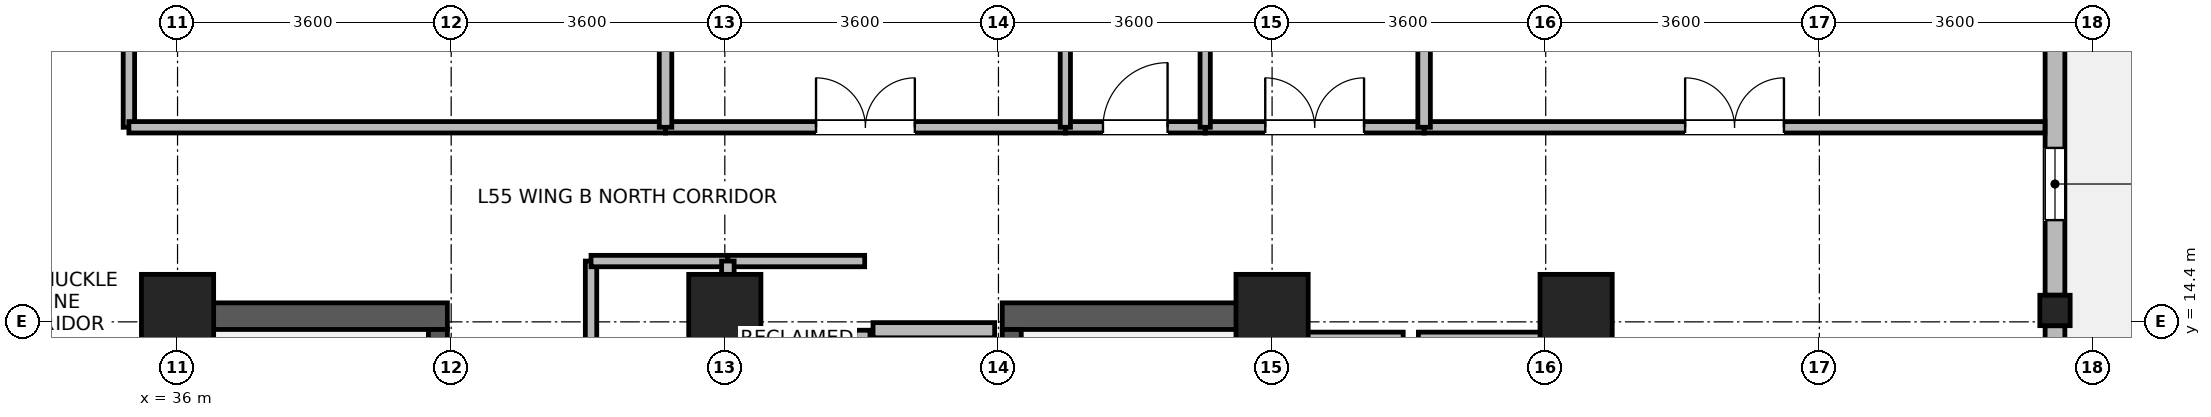
"""IFC4 building model, lengths in metres.
Left out: names, types, materials, properties, quantities, classifications, styles, units other than length and angle.
Written with IfcOpenShell. Run it as: python <this file> out.ifc"""

import sys

from ifc_helpers import new_model, si_unit, direction, frame, frame_2d, origin, origin_2d, place, context, subcontext, project, spatial, rectangle, i_section, extrude, source, transform, mapped, element, fill, save


model = new_model("IFC4")
c1 = context("Model", 3, precision=1e-05, world=origin(), true_north=direction((0.0, 1.0)))
c2 = subcontext(c1, "Body", "Model", "MODEL_VIEW")
j1 = project(units=[si_unit("LENGTHUNIT", "METRE"), si_unit("PLANEANGLEUNIT", "RADIAN")], contexts=[c1])
p1 = place(None, origin())
s1 = spatial("IfcSite", under=j1, at=p1, CompositionType="ELEMENT")
p2 = place(p1, origin())
s2 = spatial("IfcBuilding", under=s1, at=p2, CompositionType="ELEMENT")
p3 = place(p2, frame((0.0, 0.0, 216.6)))
s3 = spatial("IfcBuildingStorey", under=s2, at=p3, CompositionType="ELEMENT", Elevation=216.6)
for number, where, z_axis, x_axis in (
    (1, (36.175, 6.95, 0.0), (0.0, 0.0, 1.0), (0.0, 1.0, 0.0)),
    (2, (50.225, 6.95, 0.0), (0.0, 0.0, 1.0), (0.0, 1.0, 0.0)),
):
    element("IfcWall", number, at=place(p3, frame(where, z_axis=z_axis, x_axis=x_axis)), inside=s3, PredefinedType="SHEAR", context=c2, shape_type="SweptSolid", body=[
        extrude(rectangle(XDim=7.7, YDim=0.35, at=frame_2d((3.85, 0.0))), origin(), (0.0, 0.0, 1.0), 3.47),
    ])
for number, where, z_axis, x_axis in (
    (3, (36.35, 14.475, 0.0), (0.0, 0.0, 1.0), (1.0, 0.0, 0.0)),
    (4, (46.85, 14.475, 0.0), (0.0, 0.0, 1.0), (1.0, 0.0, 0.0)),
):
    element("IfcWall", number, at=place(p3, frame(where, z_axis=z_axis, x_axis=x_axis)), inside=s3, PredefinedType="SHEAR", context=c2, shape_type="SweptSolid", body=[
        extrude(rectangle(XDim=3.2, YDim=0.35, at=frame_2d((1.6, 0.0))), origin(), (0.0, 0.0, 1.0), 3.47),
    ])
p4 = place(p3, frame((39.425, 7.3, 0.0), z_axis=(0.0, 0.0, 1.0), x_axis=(0.0, 1.0, 0.0)))
e5 = element("IfcWall", 5, at=p4, inside=s3, PredefinedType="SHEAR", context=c2, shape_type="SweptSolid", body=[
    extrude(rectangle(XDim=7.0, YDim=0.25, at=frame_2d((3.5, 0.0))), origin(), (0.0, 0.0, 1.0), 3.47),
])
p5 = place(p4, frame((0.15, 0.0, 0.0)))
e6 = element("IfcOpeningElement", 6, at=p5, cuts=e5, PredefinedType="OPENING", context=c2, shape_type="SweptSolid", body=[
    extrude(rectangle(XDim=1.1, YDim=2.08, at=frame_2d((0.55, 1.04))), frame((0.0, 0.135, 0.0), z_axis=(0.0, -1.0, 0.0), x_axis=(1.0, 0.0, 0.0)), (0.0, 0.0, 1.0), 0.27),
])
p6 = place(p3, frame((46.975, 7.3, 0.0), z_axis=(0.0, 0.0, 1.0), x_axis=(0.0, 1.0, 0.0)))
e7 = element("IfcWall", 7, at=p6, inside=s3, PredefinedType="SHEAR", context=c2, shape_type="SweptSolid", body=[
    extrude(rectangle(XDim=7.0, YDim=0.25, at=frame_2d((3.5, 0.0))), origin(), (0.0, 0.0, 1.0), 3.47),
])
p7 = place(p6, frame((0.15, 0.0, 0.0)))
e8 = element("IfcOpeningElement", 8, at=p7, cuts=e7, PredefinedType="OPENING", context=c2, shape_type="SweptSolid", body=[
    extrude(rectangle(XDim=1.1, YDim=2.08, at=frame_2d((0.55, 1.04))), frame((0.0, 0.135, 0.0), z_axis=(0.0, -1.0, 0.0), x_axis=(1.0, 0.0, 0.0)), (0.0, 0.0, 1.0), 0.27),
])
m1 = source(origin(), c2, "Body", "SweptSolid", [
    extrude(rectangle(XDim=0.95, YDim=0.95, at=origin_2d()), origin(), (0.0, 0.0, 1.0), 3.7),
])
for number, where, z_axis, x_axis in (
    (9, (36.0, 14.55, 0.0), (0.0, 0.0, 1.0), (1.0, 0.0, 0.0)),
    (10, (43.2, 14.55, 0.0), (0.0, 0.0, 1.0), (1.0, 0.0, 0.0)),
    (11, (50.4, 14.55, 0.0), (0.0, 0.0, 1.0), (1.0, 0.0, 0.0)),
    (12, (54.4, 14.55, 0.0), (0.0, 0.0, 1.0), (1.0, 0.0, 0.0)),
):
    element("IfcColumn", number, at=place(p3, frame(where, z_axis=z_axis, x_axis=x_axis)), inside=s3, PredefinedType="COLUMN", context=c2, shape_type="MappedRepresentation", body=[
        mapped(m1, transform((0.0, 0.0, 0.0), x_axis=(1.0, 0.0, 0.0), y_axis=(0.0, 1.0, 0.0), z_axis=(0.0, 0.0, 1.0), scale=1.0)),
    ])
m2 = source(origin(), c2, "Body", "SweptSolid", [
    extrude(i_section(OverallWidth=0.399, OverallDepth=0.4, WebThickness=0.017, FlangeThickness=0.023, FilletRadius=0.015, at=origin_2d()), origin(), (0.0, 0.0, 1.0), 3.7),
])
p8 = place(p3, frame((60.7, 14.55, 0.0), z_axis=(0.0, 0.0, 1.0), x_axis=(1.0, 0.0, 0.0)))
e13 = element("IfcColumn", 13, at=p8, inside=s3, PredefinedType="COLUMN", context=c2, shape_type="MappedRepresentation", body=[
    mapped(m2, transform((0.0, 0.0, 0.0), x_axis=(1.0, 0.0, 0.0), y_axis=(0.0, 1.0, 0.0), z_axis=(0.0, 0.0, 1.0), scale=1.0)),
])
p9 = place(p3, frame((60.7, 14.349, 0.0), z_axis=(0.0, 0.0, 1.0), x_axis=(0.0, -1.0, 0.0)))
e14 = element("IfcWall", 14, at=p9, inside=s3, PredefinedType="STANDARD", context=c2, shape_type="SweptSolid", body=[
    extrude(rectangle(XDim=7.098, YDim=0.26, at=frame_2d((3.549, 0.0))), origin(), (0.0, 0.0, 1.0), 3.05),
])
p10 = place(p9, frame((2.799, 0.0, 0.0)))
e15 = element("IfcOpeningElement", 15, at=p10, cuts=e14, PredefinedType="OPENING", context=c2, shape_type="SweptSolid", body=[
    extrude(rectangle(XDim=1.5, YDim=2.15, at=frame_2d((0.75, 1.075))), frame((0.0, 0.14, 0.0), z_axis=(0.0, -1.0, 0.0), x_axis=(1.0, 0.0, 0.0)), (0.0, 0.0, 1.0), 0.28),
])
p11 = place(p3, frame((60.7, 21.399, 0.0), z_axis=(0.0, 0.0, 1.0), x_axis=(0.0, -1.0, 0.0)))
e16 = element("IfcWall", 16, at=p11, inside=s3, PredefinedType="STANDARD", context=c2, shape_type="SweptSolid", body=[
    extrude(rectangle(XDim=6.648, YDim=0.26, at=frame_2d((3.324, 0.0))), origin(), (0.0, 0.0, 1.0), 3.05),
])
p12 = place(p11, frame((0.762, 0.0, 0.85)))
e17 = element("IfcOpeningElement", 17, at=p12, cuts=e16, PredefinedType="OPENING", context=c2, shape_type="SweptSolid", body=[
    extrude(rectangle(XDim=1.8, YDim=1.85, at=frame_2d((0.9, 0.925))), frame((0.0, 0.14, 0.0), z_axis=(0.0, -1.0, 0.0), x_axis=(1.0, 0.0, 0.0)), (0.0, 0.0, 1.0), 0.28),
])
p13 = place(p11, frame((4.71, 0.0, 0.85)))
e18 = element("IfcOpeningElement", 18, at=p13, cuts=e16, PredefinedType="OPENING", context=c2, shape_type="SweptSolid", body=[
    extrude(rectangle(XDim=0.95, YDim=1.75, at=frame_2d((0.475, 0.875))), frame((0.0, 0.14, 0.0), z_axis=(0.0, -1.0, 0.0), x_axis=(1.0, 0.0, 0.0)), (0.0, 0.0, 1.0), 0.28),
])
p14 = place(p3, frame((50.475, 14.165, 0.0), z_axis=(0.0, 0.0, 1.0), x_axis=(1.0, 0.0, 0.0)))
e19 = element("IfcWall", 19, at=p14, inside=s3, PredefinedType="PARTITIONING", context=c2, shape_type="SweptSolid", body=[
    extrude(rectangle(XDim=1.65, YDim=0.2, at=frame_2d((0.825, 0.0))), origin(), (0.0, 0.0, 1.0), 3.45),
])
p15 = place(p3, frame((52.325, 14.165, 0.0), z_axis=(0.0, 0.0, 1.0), x_axis=(1.0, 0.0, 0.0)))
e20 = element("IfcWall", 20, at=p15, inside=s3, PredefinedType="PARTITIONING", context=c2, shape_type="SweptSolid", body=[
    extrude(rectangle(XDim=1.65, YDim=0.2, at=frame_2d((0.825, 0.0))), origin(), (0.0, 0.0, 1.0), 3.45),
])
p16 = place(p3, frame((45.15, 14.29, 0.0), z_axis=(0.0, 0.0, 1.0), x_axis=(1.0, 0.0, 0.0)))
e21 = element("IfcWall", 21, at=p16, inside=s3, PredefinedType="PARTITIONING", context=c2, shape_type="SweptSolid", body=[
    extrude(rectangle(XDim=1.6, YDim=0.2, at=frame_2d((0.8, 0.0))), origin(), (0.0, 0.0, 1.0), 2.55),
])
p17 = place(p3, frame((45.01, 11.61, 0.0), z_axis=(0.0, 0.0, 1.0), x_axis=(0.0, 1.0, 0.0)))
e22 = element("IfcWall", 22, at=p17, inside=s3, PredefinedType="PARTITIONING", context=c2, shape_type="SweptSolid", body=[
    extrude(rectangle(XDim=2.68, YDim=0.2, at=frame_2d((1.34, 0.0))), origin(), (0.0, 0.0, 1.0), 3.45),
])
p18 = place(p3, frame((35.36, 16.96, 0.0), z_axis=(0.0, 0.0, 1.0), x_axis=(0.0, 1.0, 0.0)))
e23 = element("IfcWall", 23, at=p18, inside=s3, PredefinedType="PARTITIONING", context=c2, shape_type="SweptSolid", body=[
    extrude(rectangle(XDim=9.8, YDim=0.15, at=frame_2d((4.9, 0.0))), origin(), (0.0, 0.0, 1.0), 3.45),
])
p19 = place(p18, frame((2.486, 0.0, 0.0)))
e24 = element("IfcOpeningElement", 24, at=p19, cuts=e23, PredefinedType="OPENING", context=c2, shape_type="SweptSolid", body=[
    extrude(rectangle(XDim=1.3, YDim=2.12, at=frame_2d((0.65, 1.06))), frame((0.0, 0.085, 0.0), z_axis=(0.0, -1.0, 0.0), x_axis=(1.0, 0.0, 0.0)), (0.0, 0.0, 1.0), 0.17),
])
p20 = place(p3, frame((52.4, 16.96, 0.0), z_axis=(0.0, 0.0, 1.0), x_axis=(1.0, 0.0, 0.0)))
e25 = element("IfcWall", 25, at=p20, inside=s3, PredefinedType="PARTITIONING", context=c2, shape_type="SweptSolid", body=[
    extrude(rectangle(XDim=8.168, YDim=0.15, at=frame_2d((4.084, 0.0))), origin(), (0.0, 0.0, 1.0), 3.45),
])
p21 = place(p20, frame((3.434, 0.0, 0.0)))
e26 = element("IfcOpeningElement", 26, at=p21, cuts=e25, PredefinedType="OPENING", context=c2, shape_type="SweptSolid", body=[
    extrude(rectangle(XDim=1.3, YDim=2.12, at=frame_2d((0.65, 1.06))), frame((0.0, 0.085, 0.0), z_axis=(0.0, -1.0, 0.0), x_axis=(1.0, 0.0, 0.0)), (0.0, 0.0, 1.0), 0.17),
])
p22 = place(p3, frame((35.36, 16.96, 0.0), z_axis=(0.0, 0.0, 1.0), x_axis=(1.0, 0.0, 0.0)))
e27 = element("IfcWall", 27, at=p22, inside=s3, PredefinedType="PARTITIONING", context=c2, shape_type="SweptSolid", body=[
    extrude(rectangle(XDim=7.06, YDim=0.15, at=frame_2d((3.53, 0.0))), origin(), (0.0, 0.0, 1.0), 3.45),
])
p23 = place(p3, frame((42.42, 16.96, 0.0), z_axis=(0.0, 0.0, 1.0), x_axis=(1.0, 0.0, 0.0)))
e28 = element("IfcWall", 28, at=p23, inside=s3, PredefinedType="PARTITIONING", context=c2, shape_type="SweptSolid", body=[
    extrude(rectangle(XDim=5.26, YDim=0.15, at=frame_2d((2.63, 0.0))), origin(), (0.0, 0.0, 1.0), 3.45),
])
p24 = place(p23, frame((1.98, 0.0, 0.0)))
e29 = element("IfcOpeningElement", 29, at=p24, cuts=e28, PredefinedType="OPENING", context=c2, shape_type="SweptSolid", body=[
    extrude(rectangle(XDim=1.3, YDim=2.12, at=frame_2d((0.65, 1.06))), frame((0.0, 0.085, 0.0), z_axis=(0.0, -1.0, 0.0), x_axis=(1.0, 0.0, 0.0)), (0.0, 0.0, 1.0), 0.17),
])
p25 = place(p3, frame((41.44, 11.64, 0.0), z_axis=(0.0, 0.0, 1.0), x_axis=(0.0, 1.0, 0.0)))
e30 = element("IfcWall", 30, at=p25, inside=s3, PredefinedType="PARTITIONING", context=c2, shape_type="SweptSolid", body=[
    extrude(rectangle(XDim=3.56, YDim=0.15, at=frame_2d((1.78, 0.0))), origin(), (0.0, 0.0, 1.0), 3.45),
])
p26 = place(p25, frame((1.13, 0.0, 0.0)))
e31 = element("IfcOpeningElement", 31, at=p26, cuts=e30, PredefinedType="OPENING", context=c2, shape_type="SweptSolid", body=[
    extrude(rectangle(XDim=1.3, YDim=2.12, at=frame_2d((0.65, 1.06))), frame((0.0, 0.085, 0.0), z_axis=(0.0, -1.0, 0.0), x_axis=(1.0, 0.0, 0.0)), (0.0, 0.0, 1.0), 0.17),
])
p27 = place(p3, frame((49.52, 16.96, 0.0), z_axis=(0.0, 0.0, 1.0), x_axis=(1.0, 0.0, 0.0)))
e32 = element("IfcWall", 32, at=p27, inside=s3, PredefinedType="PARTITIONING", context=c2, shape_type="SweptSolid", body=[
    extrude(rectangle(XDim=2.88, YDim=0.15, at=frame_2d((1.44, 0.0))), origin(), (0.0, 0.0, 1.0), 3.45),
])
p28 = place(p27, frame((0.79, 0.0, 0.0)))
e33 = element("IfcOpeningElement", 33, at=p28, cuts=e32, PredefinedType="OPENING", context=c2, shape_type="SweptSolid", body=[
    extrude(rectangle(XDim=1.3, YDim=2.12, at=frame_2d((0.65, 1.06))), frame((0.0, 0.085, 0.0), z_axis=(0.0, -1.0, 0.0), x_axis=(1.0, 0.0, 0.0)), (0.0, 0.0, 1.0), 0.17),
])
p29 = place(p3, frame((47.68, 16.96, 0.0), z_axis=(0.0, 0.0, 1.0), x_axis=(1.0, 0.0, 0.0)))
e34 = element("IfcWall", 34, at=p29, inside=s3, PredefinedType="PARTITIONING", context=c2, shape_type="SweptSolid", body=[
    extrude(rectangle(XDim=1.84, YDim=0.15, at=frame_2d((0.92, 0.0))), origin(), (0.0, 0.0, 1.0), 3.45),
])
p30 = place(p29, frame((0.495, 0.0, 0.0)))
e35 = element("IfcOpeningElement", 35, at=p30, cuts=e34, PredefinedType="OPENING", context=c2, shape_type="SweptSolid", body=[
    extrude(rectangle(XDim=0.85, YDim=2.04, at=frame_2d((0.425, 1.02))), frame((0.0, 0.085, 0.0), z_axis=(0.0, -1.0, 0.0), x_axis=(1.0, 0.0, 0.0)), (0.0, 0.0, 1.0), 0.17),
])
for number, where, z_axis, x_axis in (
    (36, (41.44, 15.2, 0.0), (0.0, 0.0, 1.0), (1.0, 0.0, 0.0)),
    (37, (43.24, 15.2, 0.0), (0.0, 0.0, 1.0), (1.0, 0.0, 0.0)),
):
    element("IfcWall", number, at=place(p3, frame(where, z_axis=z_axis, x_axis=x_axis)), inside=s3, PredefinedType="PARTITIONING", context=c2, shape_type="SweptSolid", body=[
        extrude(rectangle(XDim=1.8, YDim=0.15, at=frame_2d((0.9, 0.0))), origin(), (0.0, 0.0, 1.0), 3.45),
    ])
p31 = place(p3, frame((42.42, 16.96, 0.0), z_axis=(0.0, 0.0, 1.0), x_axis=(0.0, 1.0, 0.0)))
e38 = element("IfcWall", 38, at=p31, inside=s3, PredefinedType="PARTITIONING", context=c2, shape_type="SweptSolid", body=[
    extrude(rectangle(XDim=9.8, YDim=0.165, at=frame_2d((4.9, 0.0))), origin(), (0.0, 0.0, 1.0), 3.45),
])
for number, where, z_axis, x_axis in (
    (39, (47.68, 16.96, 0.0), (0.0, 0.0, 1.0), (0.0, 1.0, 0.0)),
    (40, (49.52, 16.96, 0.0), (0.0, 0.0, 1.0), (0.0, 1.0, 0.0)),
):
    element("IfcWall", number, at=place(p3, frame(where, z_axis=z_axis, x_axis=x_axis)), inside=s3, PredefinedType="PARTITIONING", context=c2, shape_type="SweptSolid", body=[
        extrude(rectangle(XDim=9.8, YDim=0.135, at=frame_2d((4.9, 0.0))), origin(), (0.0, 0.0, 1.0), 3.45),
    ])
p32 = place(p3, frame((52.4, 16.96, 0.0), z_axis=(0.0, 0.0, 1.0), x_axis=(0.0, 1.0, 0.0)))
e41 = element("IfcWall", 41, at=p32, inside=s3, PredefinedType="PARTITIONING", context=c2, shape_type="SweptSolid", body=[
    extrude(rectangle(XDim=9.8, YDim=0.165, at=frame_2d((4.9, 0.0))), origin(), (0.0, 0.0, 1.0), 3.45),
])
p33 = place(p3, frame((43.24, 11.64, 0.0), z_axis=(0.0, 0.0, 1.0), x_axis=(0.0, 1.0, 0.0)))
e42 = element("IfcWall", 42, at=p33, inside=s3, PredefinedType="PARTITIONING", context=c2, shape_type="SweptSolid", body=[
    extrude(rectangle(XDim=3.56, YDim=0.165, at=frame_2d((1.78, 0.0))), origin(), (0.0, 0.0, 1.0), 3.45),
])
p34 = place(p13, origin())
e43 = element("IfcWindow", 43, at=p34, inside=s3, PartitioningType="SINGLE_PANEL", PredefinedType="WINDOW", context=c2, shape_type="SweptSolid", body=[
    extrude(rectangle(XDim=0.95, YDim=1.75, at=frame_2d((0.475, 0.875))), frame((0.0, 0.03, 0.0), z_axis=(0.0, -1.0, 0.0), x_axis=(1.0, 0.0, 0.0)), (0.0, 0.0, 1.0), 0.06),
])
fill(e18, e43)
p35 = place(p21, origin())
e44 = element("IfcDoor", 44, at=p35, inside=s3, OperationType="DOUBLE_DOOR_SINGLE_SWING", PredefinedType="DOOR", context=c2, shape_type="SweptSolid", body=[
    extrude(rectangle(XDim=1.3, YDim=2.12, at=frame_2d((0.65, 1.06))), frame((0.0, 0.025, 0.0), z_axis=(0.0, -1.0, 0.0), x_axis=(1.0, 0.0, 0.0)), (0.0, 0.0, 1.0), 0.05),
])
fill(e26, e44)
p36 = place(p24, origin())
e45 = element("IfcDoor", 45, at=p36, inside=s3, OperationType="DOUBLE_DOOR_SINGLE_SWING", PredefinedType="DOOR", context=c2, shape_type="SweptSolid", body=[
    extrude(rectangle(XDim=1.3, YDim=2.12, at=frame_2d((0.65, 1.06))), frame((0.0, 0.025, 0.0), z_axis=(0.0, -1.0, 0.0), x_axis=(1.0, 0.0, 0.0)), (0.0, 0.0, 1.0), 0.05),
])
fill(e29, e45)
p37 = place(p28, origin())
e46 = element("IfcDoor", 46, at=p37, inside=s3, OperationType="DOUBLE_DOOR_SINGLE_SWING", PredefinedType="DOOR", context=c2, shape_type="SweptSolid", body=[
    extrude(rectangle(XDim=1.3, YDim=2.12, at=frame_2d((0.65, 1.06))), frame((0.0, 0.025, 0.0), z_axis=(0.0, -1.0, 0.0), x_axis=(1.0, 0.0, 0.0)), (0.0, 0.0, 1.0), 0.05),
])
fill(e33, e46)
p38 = place(p30, origin())
e47 = element("IfcDoor", 47, at=p38, inside=s3, OperationType="SINGLE_SWING_RIGHT", PredefinedType="DOOR", context=c2, shape_type="SweptSolid", body=[
    extrude(rectangle(XDim=0.85, YDim=2.04, at=frame_2d((0.425, 1.02))), frame((0.0, 0.025, 0.0), z_axis=(0.0, -1.0, 0.0), x_axis=(1.0, 0.0, 0.0)), (0.0, 0.0, 1.0), 0.05),
])
fill(e35, e47)
save(model, sys.argv[1])
